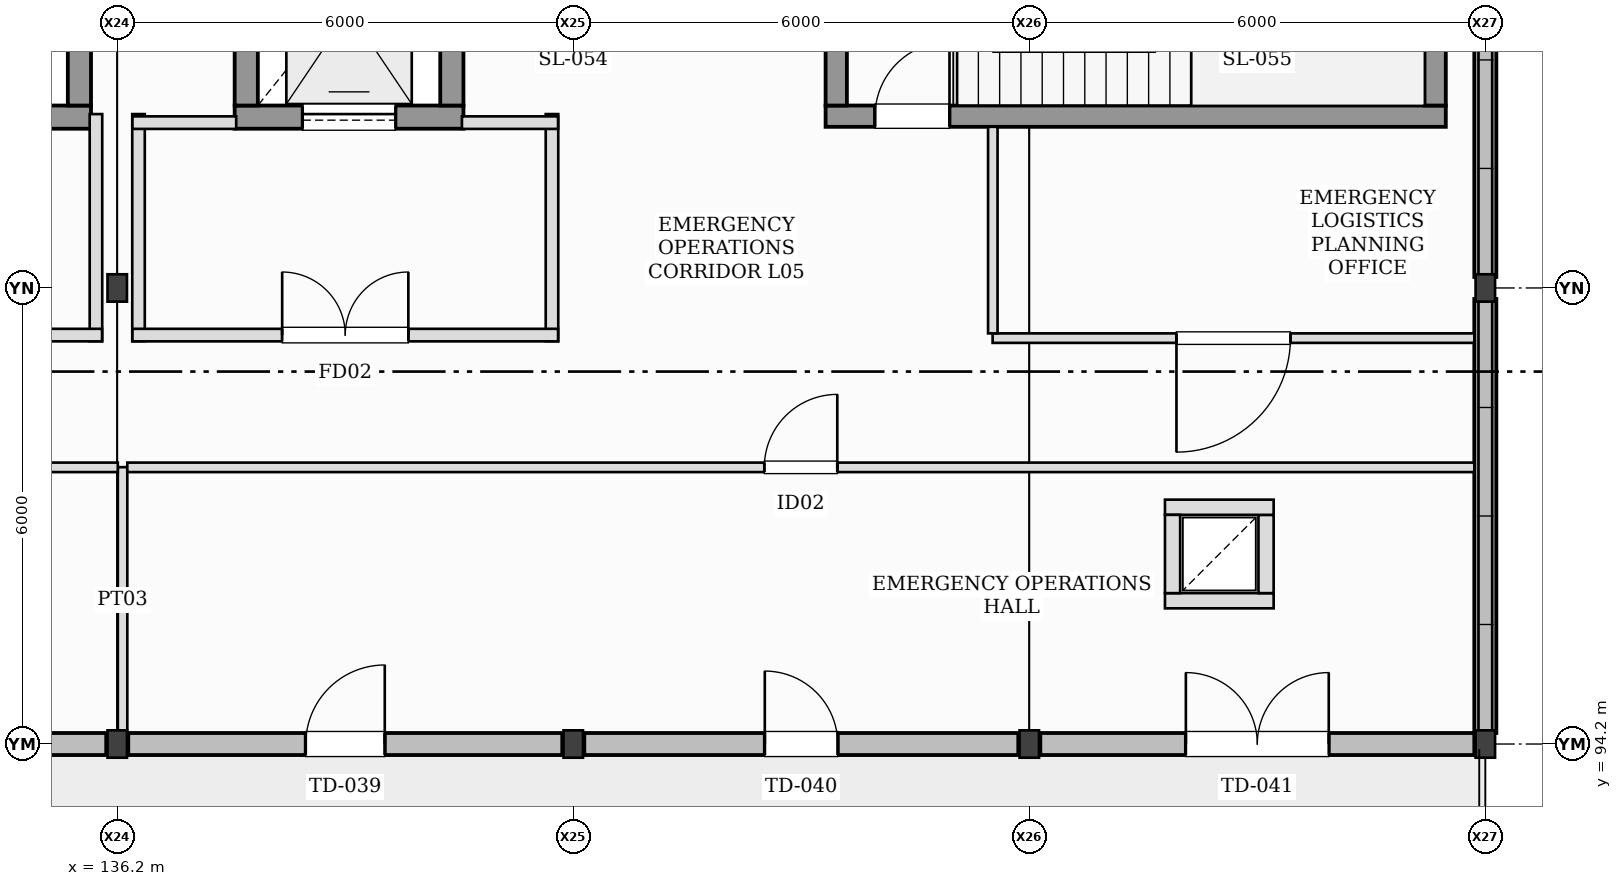
"""IFC4 building model, lengths in metres.
Left out: names, types, materials, properties, quantities, classifications, styles, units other than length and angle.
Written with IfcOpenShell. Run it as: python <this file> out.ifc"""

import sys

from ifc_helpers import new_model, si_unit, direction, frame, frame_2d, origin, origin_2d, place, context, subcontext, project, spatial, rectangle, i_section, extrude, element, fill, save


model = new_model("IFC4")
c1 = context("Model", 3, precision=1e-05, world=origin(), true_north=direction((0.0, 1.0)))
c2 = subcontext(c1, "Body", "Model", "MODEL_VIEW")
j1 = project(units=[si_unit("LENGTHUNIT", "METRE"), si_unit("PLANEANGLEUNIT", "RADIAN")], contexts=[c1])
p1 = place(None, origin())
s1 = spatial("IfcSite", under=j1, at=p1, CompositionType="ELEMENT")
p2 = place(p1, origin())
s2 = spatial("IfcBuilding", under=s1, at=p2, CompositionType="ELEMENT")
p3 = place(p2, frame((0.0, 0.0, 18.0)))
s3 = spatial("IfcBuildingStorey", under=s2, at=p3, CompositionType="ELEMENT", Elevation=18.0)
for number, where, z_axis, x_axis in (
    (1, (136.2, 94.2, 0.0), (0.0, 0.0, 1.0), (1.0, 0.0, 0.0)),
    (2, (136.2, 100.2, 0.0), (0.0, 0.0, 1.0), (1.0, 0.0, 0.0)),
    (3, (142.2, 94.2, 0.0), (0.0, 0.0, 1.0), (1.0, 0.0, 0.0)),
    (4, (148.2, 94.2, 0.0), (0.0, 0.0, 1.0), (1.0, 0.0, 0.0)),
    (5, (154.2, 94.2, 0.0), (0.0, 0.0, 1.0), (1.0, 0.0, 0.0)),
    (6, (154.2, 100.2, 0.0), (0.0, 0.0, 1.0), (1.0, 0.0, 0.0)),
):
    element("IfcColumn", number, at=place(p3, frame(where, z_axis=z_axis, x_axis=x_axis)), inside=s3, PredefinedType="COLUMN", context=c2, shape_type="SweptSolid", body=[
        extrude(i_section(OverallWidth=0.256, OverallDepth=0.36, WebThickness=0.011, FlangeThickness=0.02, at=origin_2d()), origin(), (0.0, 0.0, 1.0), 3.6),
    ])
p4 = place(p3, frame((130.345, 94.2, 0.0), z_axis=(0.0, 0.0, 1.0), x_axis=(1.0, 0.0, 0.0)))
e7 = element("IfcWall", 7, at=p4, inside=s3, PredefinedType="STANDARD", context=c2, shape_type="SweptSolid", body=[
    extrude(rectangle(XDim=5.71, YDim=0.29, at=frame_2d((2.855, 0.0))), origin(), (0.0, 0.0, 1.0), 3.6),
])
p5 = place(p4, frame((2.045, 0.0, 0.0)))
e8 = element("IfcOpeningElement", 8, at=p5, cuts=e7, PredefinedType="OPENING", context=c2, shape_type="SweptSolid", body=[
    extrude(rectangle(XDim=1.62, YDim=2.2, at=frame_2d((0.81, 1.1))), frame((0.0, 0.155, 0.0), z_axis=(0.0, -1.0, 0.0), x_axis=(1.0, 0.0, 0.0)), (0.0, 0.0, 1.0), 0.31),
])
p6 = place(p3, frame((136.345, 94.2, 0.0), z_axis=(0.0, 0.0, 1.0), x_axis=(1.0, 0.0, 0.0)))
e9 = element("IfcWall", 9, at=p6, inside=s3, PredefinedType="STANDARD", context=c2, shape_type="SweptSolid", body=[
    extrude(rectangle(XDim=5.71, YDim=0.29, at=frame_2d((2.855, 0.0))), origin(), (0.0, 0.0, 1.0), 3.6),
])
p7 = place(p6, frame((2.335, 0.0, 0.0)))
e10 = element("IfcOpeningElement", 10, at=p7, cuts=e9, PredefinedType="OPENING", context=c2, shape_type="SweptSolid", body=[
    extrude(rectangle(XDim=1.04, YDim=2.16, at=frame_2d((0.52, 1.08))), frame((0.0, 0.155, 0.0), z_axis=(0.0, -1.0, 0.0), x_axis=(1.0, 0.0, 0.0)), (0.0, 0.0, 1.0), 0.31),
])
p8 = place(p3, frame((142.345, 94.2, 0.0), z_axis=(0.0, 0.0, 1.0), x_axis=(1.0, 0.0, 0.0)))
e11 = element("IfcWall", 11, at=p8, inside=s3, PredefinedType="STANDARD", context=c2, shape_type="SweptSolid", body=[
    extrude(rectangle(XDim=5.71, YDim=0.29, at=frame_2d((2.855, 0.0))), origin(), (0.0, 0.0, 1.0), 3.219),
])
p9 = place(p8, frame((2.375, 0.0, 0.0)))
e12 = element("IfcOpeningElement", 12, at=p9, cuts=e11, PredefinedType="OPENING", context=c2, shape_type="SweptSolid", body=[
    extrude(rectangle(XDim=0.96, YDim=2.14, at=frame_2d((0.48, 1.07))), frame((0.0, 0.155, 0.0), z_axis=(0.0, -1.0, 0.0), x_axis=(1.0, 0.0, 0.0)), (0.0, 0.0, 1.0), 0.31),
])
p10 = place(p3, frame((148.345, 94.2, 0.0), z_axis=(0.0, 0.0, 1.0), x_axis=(1.0, 0.0, 0.0)))
e13 = element("IfcWall", 13, at=p10, inside=s3, PredefinedType="STANDARD", context=c2, shape_type="SweptSolid", body=[
    extrude(rectangle(XDim=5.71, YDim=0.29, at=frame_2d((2.855, 0.0))), origin(), (0.0, 0.0, 1.0), 3.219),
])
p11 = place(p10, frame((1.915, 0.0, 0.0)))
e14 = element("IfcOpeningElement", 14, at=p11, cuts=e13, PredefinedType="OPENING", context=c2, shape_type="SweptSolid", body=[
    extrude(rectangle(XDim=1.88, YDim=2.28, at=frame_2d((0.94, 1.14))), frame((0.0, 0.155, 0.0), z_axis=(0.0, -1.0, 0.0), x_axis=(1.0, 0.0, 0.0)), (0.0, 0.0, 1.0), 0.31),
])
p12 = place(p3, frame((154.2, 94.345, 0.0), z_axis=(0.0, 0.0, 1.0), x_axis=(0.0, 1.0, 0.0)))
e15 = element("IfcWall", 15, at=p12, inside=s3, PredefinedType="STANDARD", context=c2, shape_type="SweptSolid", body=[
    extrude(rectangle(XDim=5.71, YDim=0.29, at=frame_2d((2.855, 0.0))), origin(), (0.0, 0.0, 1.0), 0.44),
])
p13 = place(p3, frame((154.2, 100.345, 0.0), z_axis=(0.0, 0.0, 1.0), x_axis=(0.0, 1.0, 0.0)))
e16 = element("IfcWall", 16, at=p13, inside=s3, PredefinedType="STANDARD", context=c2, shape_type="SweptSolid", body=[
    extrude(rectangle(XDim=5.71, YDim=0.29, at=frame_2d((2.855, 0.0))), origin(), (0.0, 0.0, 1.0), 0.56),
])
p14 = place(p3, frame((145.52, 102.46, 0.0), z_axis=(0.0, 0.0, 1.0), x_axis=(1.0, 0.0, 0.0)))
e17 = element("IfcWall", 17, at=p14, inside=s3, PredefinedType="SHEAR", context=c2, shape_type="SweptSolid", body=[
    extrude(rectangle(XDim=8.16, YDim=0.28, at=frame_2d((4.08, 0.0))), origin(), (0.0, 0.0, 1.0), 3.45),
])
p15 = place(p14, frame((0.65, 0.0, 0.0)))
e18 = element("IfcOpeningElement", 18, at=p15, cuts=e17, PredefinedType="OPENING", context=c2, shape_type="SweptSolid", body=[
    extrude(rectangle(XDim=0.98, YDim=2.15, at=frame_2d((0.49, 1.075))), frame((0.0, 0.15, 0.0), z_axis=(0.0, -1.0, 0.0), x_axis=(1.0, 0.0, 0.0)), (0.0, 0.0, 1.0), 0.3),
])
for number, where, z_axis, x_axis in (
    (19, (145.66, 105.6, 0.0), (0.0, 0.0, 1.0), (0.0, -1.0, 0.0)),
    (20, (153.54, 102.6, 0.0), (0.0, 0.0, 1.0), (0.0, 1.0, 0.0)),
):
    element("IfcWall", number, at=place(p3, frame(where, z_axis=z_axis, x_axis=x_axis)), inside=s3, PredefinedType="SHEAR", context=c2, shape_type="SweptSolid", body=[
        extrude(rectangle(XDim=3.0, YDim=0.28, at=frame_2d((1.5, 0.0))), origin(), (0.0, 0.0, 1.0), 3.45),
    ])
p16 = place(p3, frame((132.845, 102.448, 0.0), z_axis=(0.0, 0.0, 1.0), x_axis=(1.0, 0.0, 0.0)))
e21 = element("IfcWall", 21, at=p16, inside=s3, PredefinedType="SHEAR", context=c2, shape_type="SweptSolid", body=[
    extrude(rectangle(XDim=3.01, YDim=0.305, at=frame_2d((1.505, 0.0))), origin(), (0.0, 0.0, 1.0), 3.45),
])
p17 = place(p16, frame((0.895, 0.0, 0.0)))
e22 = element("IfcOpeningElement", 22, at=p17, cuts=e21, PredefinedType="OPENING", context=c2, shape_type="SweptSolid", body=[
    extrude(rectangle(XDim=1.22, YDim=2.22, at=frame_2d((0.61, 1.11))), frame((0.0, 0.162, 0.0), z_axis=(0.0, -1.0, 0.0), x_axis=(1.0, 0.0, 0.0)), (0.0, 0.0, 1.0), 0.325),
])
p18 = place(p3, frame((135.702, 102.6, 0.0), z_axis=(0.0, 0.0, 1.0), x_axis=(0.0, 1.0, 0.0)))
e23 = element("IfcWall", 23, at=p18, inside=s3, PredefinedType="SHEAR", context=c2, shape_type="SweptSolid", body=[
    extrude(rectangle(XDim=3.0, YDim=0.305, at=frame_2d((1.5, 0.0))), origin(), (0.0, 0.0, 1.0), 3.45),
])
p19 = place(p3, frame((135.92, 102.488, 0.0), z_axis=(0.0, 0.0, 1.0), x_axis=(0.0, -1.0, 0.0)))
e24 = element("IfcWall", 24, at=p19, inside=s3, PredefinedType="PARTITIONING", context=c2, shape_type="SweptSolid", body=[
    extrude(rectangle(XDim=2.988, YDim=0.165, at=frame_2d((1.494, 0.0))), origin(), (0.0, 0.0, 1.0), 3.36),
])
p20 = place(p3, frame((130.4, 99.58, 0.0), z_axis=(0.0, 0.0, 1.0), x_axis=(1.0, 0.0, 0.0)))
e25 = element("IfcWall", 25, at=p20, inside=s3, PredefinedType="PARTITIONING", context=c2, shape_type="SweptSolid", body=[
    extrude(rectangle(XDim=5.6, YDim=0.165, at=frame_2d((2.8, 0.0))), origin(), (0.0, 0.0, 1.0), 3.36),
])
p21 = place(p20, frame((1.97, 0.0, 0.0)))
e26 = element("IfcOpeningElement", 26, at=p21, cuts=e25, PredefinedType="OPENING", context=c2, shape_type="SweptSolid", body=[
    extrude(rectangle(XDim=1.66, YDim=2.2, at=frame_2d((0.83, 1.1))), frame((0.0, 0.093, 0.0), z_axis=(0.0, -1.0, 0.0), x_axis=(1.0, 0.0, 0.0)), (0.0, 0.0, 1.0), 0.185),
])
p22 = place(p3, frame((137.745, 102.448, 0.0), z_axis=(0.0, 0.0, 1.0), x_axis=(1.0, 0.0, 0.0)))
e27 = element("IfcWall", 27, at=p22, inside=s3, PredefinedType="SHEAR", context=c2, shape_type="SweptSolid", body=[
    extrude(rectangle(XDim=3.01, YDim=0.305, at=frame_2d((1.505, 0.0))), origin(), (0.0, 0.0, 1.0), 3.45),
])
p23 = place(p22, frame((0.895, 0.0, 0.0)))
e28 = element("IfcOpeningElement", 28, at=p23, cuts=e27, PredefinedType="OPENING", context=c2, shape_type="SweptSolid", body=[
    extrude(rectangle(XDim=1.22, YDim=2.22, at=frame_2d((0.61, 1.11))), frame((0.0, 0.162, 0.0), z_axis=(0.0, -1.0, 0.0), x_axis=(1.0, 0.0, 0.0)), (0.0, 0.0, 1.0), 0.325),
])
for number, where, z_axis, x_axis in (
    (29, (137.897, 105.6, 0.0), (0.0, 0.0, 1.0), (0.0, -1.0, 0.0)),
    (30, (140.603, 102.6, 0.0), (0.0, 0.0, 1.0), (0.0, 1.0, 0.0)),
):
    element("IfcWall", number, at=place(p3, frame(where, z_axis=z_axis, x_axis=x_axis)), inside=s3, PredefinedType="SHEAR", context=c2, shape_type="SweptSolid", body=[
        extrude(rectangle(XDim=3.0, YDim=0.305, at=frame_2d((1.5, 0.0))), origin(), (0.0, 0.0, 1.0), 3.45),
    ])
p24 = place(p3, frame((136.48, 99.5, 0.0), z_axis=(0.0, 0.0, 1.0), x_axis=(0.0, 1.0, 0.0)))
e31 = element("IfcWall", 31, at=p24, inside=s3, PredefinedType="PARTITIONING", context=c2, shape_type="SweptSolid", body=[
    extrude(rectangle(XDim=2.988, YDim=0.165, at=frame_2d((1.494, 0.0))), origin(), (0.0, 0.0, 1.0), 3.36),
])
p25 = place(p3, frame((141.92, 102.488, 0.0), z_axis=(0.0, 0.0, 1.0), x_axis=(0.0, -1.0, 0.0)))
e32 = element("IfcWall", 32, at=p25, inside=s3, PredefinedType="PARTITIONING", context=c2, shape_type="SweptSolid", body=[
    extrude(rectangle(XDim=2.988, YDim=0.165, at=frame_2d((1.494, 0.0))), origin(), (0.0, 0.0, 1.0), 3.246),
])
p26 = place(p3, frame((136.4, 102.375, 0.0), z_axis=(0.0, 0.0, 1.0), x_axis=(1.0, 0.0, 0.0)))
e33 = element("IfcWall", 33, at=p26, inside=s3, PredefinedType="PARTITIONING", context=c2, shape_type="SweptSolid", body=[
    extrude(rectangle(XDim=1.365, YDim=0.165, at=frame_2d((0.683, 0.0))), origin(), (0.0, 0.0, 1.0), 3.36),
])
p27 = place(p3, frame((140.735, 102.375, 0.0), z_axis=(0.0, 0.0, 1.0), x_axis=(1.0, 0.0, 0.0)))
e34 = element("IfcWall", 34, at=p27, inside=s3, PredefinedType="PARTITIONING", context=c2, shape_type="SweptSolid", body=[
    extrude(rectangle(XDim=1.265, YDim=0.165, at=frame_2d((0.632, 0.0))), origin(), (0.0, 0.0, 1.0), 3.36),
])
p28 = place(p3, frame((136.4, 99.58, 0.0), z_axis=(0.0, 0.0, 1.0), x_axis=(1.0, 0.0, 0.0)))
e35 = element("IfcWall", 35, at=p28, inside=s3, PredefinedType="PARTITIONING", context=c2, shape_type="SweptSolid", body=[
    extrude(rectangle(XDim=5.6, YDim=0.165, at=frame_2d((2.8, 0.0))), origin(), (0.0, 0.0, 1.0), 3.36),
])
p29 = place(p28, frame((1.97, 0.0, 0.0)))
e36 = element("IfcOpeningElement", 36, at=p29, cuts=e35, PredefinedType="OPENING", context=c2, shape_type="SweptSolid", body=[
    extrude(rectangle(XDim=1.66, YDim=2.2, at=frame_2d((0.83, 1.1))), frame((0.0, 0.093, 0.0), z_axis=(0.0, -1.0, 0.0), x_axis=(1.0, 0.0, 0.0)), (0.0, 0.0, 1.0), 0.185),
])
p30 = place(p3, frame((149.985, 96.085, 0.0), z_axis=(0.0, 0.0, 1.0), x_axis=(1.0, 0.0, 0.0)))
e37 = element("IfcWall", 37, at=p30, inside=s3, PredefinedType="PARTITIONING", context=c2, shape_type="SweptSolid", body=[
    extrude(rectangle(XDim=1.43, YDim=0.2, at=frame_2d((0.715, 0.0))), origin(), (0.0, 0.0, 1.0), 3.36),
])
p31 = place(p3, frame((151.315, 96.185, 0.0), z_axis=(0.0, 0.0, 1.0), x_axis=(0.0, 1.0, 0.0)))
e38 = element("IfcWall", 38, at=p31, inside=s3, PredefinedType="PARTITIONING", context=c2, shape_type="SweptSolid", body=[
    extrude(rectangle(XDim=1.03, YDim=0.2, at=frame_2d((0.515, 0.0))), origin(), (0.0, 0.0, 1.0), 3.36),
])
p32 = place(p3, frame((151.415, 97.315, 0.0), z_axis=(0.0, 0.0, 1.0), x_axis=(-1.0, 0.0, 0.0)))
e39 = element("IfcWall", 39, at=p32, inside=s3, PredefinedType="PARTITIONING", context=c2, shape_type="SweptSolid", body=[
    extrude(rectangle(XDim=1.43, YDim=0.2, at=frame_2d((0.715, 0.0))), origin(), (0.0, 0.0, 1.0), 3.36),
])
p33 = place(p3, frame((150.085, 97.215, 0.0), z_axis=(0.0, 0.0, 1.0), x_axis=(0.0, -1.0, 0.0)))
e40 = element("IfcWall", 40, at=p33, inside=s3, PredefinedType="PARTITIONING", context=c2, shape_type="SweptSolid", body=[
    extrude(rectangle(XDim=1.03, YDim=0.2, at=frame_2d((0.515, 0.0))), origin(), (0.0, 0.0, 1.0), 3.36),
])
p34 = place(p3, frame((136.27, 94.345, 0.0), z_axis=(0.0, 0.0, 1.0), x_axis=(0.0, 1.0, 0.0)))
e41 = element("IfcWall", 41, at=p34, inside=s3, PredefinedType="PARTITIONING", context=c2, shape_type="SweptSolid", body=[
    extrude(rectangle(XDim=3.498, YDim=0.125, at=frame_2d((1.749, 0.0))), origin(), (0.0, 0.0, 1.0), 3.36),
])
p35 = place(p3, frame((136.333, 97.84, 0.0), z_axis=(0.0, 0.0, 1.0), x_axis=(1.0, 0.0, 0.0)))
e42 = element("IfcWall", 42, at=p35, inside=s3, PredefinedType="PARTITIONING", context=c2, shape_type="SweptSolid", body=[
    extrude(rectangle(XDim=17.722, YDim=0.125, at=frame_2d((8.861, 0.0))), origin(), (0.0, 0.0, 1.0), 3.36),
])
p36 = place(p35, frame((8.381, 0.0, 0.0)))
e43 = element("IfcOpeningElement", 43, at=p36, cuts=e42, PredefinedType="OPENING", context=c2, shape_type="SweptSolid", body=[
    extrude(rectangle(XDim=0.96, YDim=2.15, at=frame_2d((0.48, 1.075))), frame((0.0, 0.073, 0.0), z_axis=(0.0, -1.0, 0.0), x_axis=(1.0, 0.0, 0.0)), (0.0, 0.0, 1.0), 0.145),
])
p37 = place(p3, frame((130.143, 97.84, 0.0), z_axis=(0.0, 0.0, 1.0), x_axis=(1.0, 0.0, 0.0)))
e44 = element("IfcWall", 44, at=p37, inside=s3, PredefinedType="PARTITIONING", context=c2, shape_type="SweptSolid", body=[
    extrude(rectangle(XDim=6.065, YDim=0.125, at=frame_2d((3.032, 0.0))), origin(), (0.0, 0.0, 1.0), 3.36),
])
p38 = place(p37, frame((2.452, 0.0, 0.0)))
e45 = element("IfcOpeningElement", 45, at=p38, cuts=e44, PredefinedType="OPENING", context=c2, shape_type="SweptSolid", body=[
    extrude(rectangle(XDim=1.16, YDim=2.2, at=frame_2d((0.58, 1.1))), frame((0.0, 0.073, 0.0), z_axis=(0.0, -1.0, 0.0), x_axis=(1.0, 0.0, 0.0)), (0.0, 0.0, 1.0), 0.145),
])
p39 = place(p3, frame((154.055, 99.54, 0.0), z_axis=(0.0, 0.0, 1.0), x_axis=(-1.0, 0.0, 0.0)))
e46 = element("IfcWall", 46, at=p39, inside=s3, PredefinedType="PARTITIONING", context=c2, shape_type="SweptSolid", body=[
    extrude(rectangle(XDim=6.337, YDim=0.125, at=frame_2d((3.169, 0.0))), origin(), (0.0, 0.0, 1.0), 3.36),
])
p40 = place(p39, frame((2.419, 0.0, 0.0)))
e47 = element("IfcOpeningElement", 47, at=p40, cuts=e46, PredefinedType="OPENING", context=c2, shape_type="SweptSolid", body=[
    extrude(rectangle(XDim=1.5, YDim=2.22, at=frame_2d((0.75, 1.11))), frame((0.0, 0.073, 0.0), z_axis=(0.0, -1.0, 0.0), x_axis=(1.0, 0.0, 0.0)), (0.0, 0.0, 1.0), 0.145),
])
p41 = place(p3, frame((147.72, 99.603, 0.0), z_axis=(0.0, 0.0, 1.0), x_axis=(0.0, 1.0, 0.0)))
e48 = element("IfcWall", 48, at=p41, inside=s3, PredefinedType="PARTITIONING", context=c2, shape_type="SweptSolid", body=[
    extrude(rectangle(XDim=2.718, YDim=0.125, at=frame_2d((1.359, 0.0))), origin(), (0.0, 0.0, 1.0), 3.36),
])
p42 = place(p7, frame((1.04, 0.0, 0.0), z_axis=(0.0, 0.0, 1.0), x_axis=(-1.0, 0.0, 0.0)))
e49 = element("IfcDoor", 49, at=p42, inside=s3, OperationType="SINGLE_SWING_RIGHT", PredefinedType="DOOR", context=c2, shape_type="SweptSolid", body=[
    extrude(rectangle(XDim=1.04, YDim=2.16, at=frame_2d((0.52, 1.08))), frame((0.0, 0.025, 0.0), z_axis=(0.0, -1.0, 0.0), x_axis=(1.0, 0.0, 0.0)), (0.0, 0.0, 1.0), 0.05),
])
fill(e10, e49)
p43 = place(p9, frame((0.96, 0.0, 0.0), z_axis=(0.0, 0.0, 1.0), x_axis=(-1.0, 0.0, 0.0)))
e50 = element("IfcDoor", 50, at=p43, inside=s3, OperationType="SINGLE_SWING_LEFT", PredefinedType="DOOR", context=c2, shape_type="SweptSolid", body=[
    extrude(rectangle(XDim=0.96, YDim=2.14, at=frame_2d((0.48, 1.07))), frame((0.0, 0.025, 0.0), z_axis=(0.0, -1.0, 0.0), x_axis=(1.0, 0.0, 0.0)), (0.0, 0.0, 1.0), 0.05),
])
fill(e12, e50)
p44 = place(p11, frame((1.88, 0.0, 0.0), z_axis=(0.0, 0.0, 1.0), x_axis=(-1.0, 0.0, 0.0)))
e51 = element("IfcDoor", 51, at=p44, inside=s3, OperationType="DOUBLE_DOOR_SINGLE_SWING", PredefinedType="DOOR", context=c2, shape_type="SweptSolid", body=[
    extrude(rectangle(XDim=1.88, YDim=2.28, at=frame_2d((0.94, 1.14))), frame((0.0, 0.025, 0.0), z_axis=(0.0, -1.0, 0.0), x_axis=(1.0, 0.0, 0.0)), (0.0, 0.0, 1.0), 0.05),
])
fill(e14, e51)
p45 = place(p15, origin())
e52 = element("IfcDoor", 52, at=p45, inside=s3, OperationType="SINGLE_SWING_RIGHT", PredefinedType="DOOR", context=c2, shape_type="SweptSolid", body=[
    extrude(rectangle(XDim=0.98, YDim=2.15, at=frame_2d((0.49, 1.075))), frame((0.0, 0.025, 0.0), z_axis=(0.0, -1.0, 0.0), x_axis=(1.0, 0.0, 0.0)), (0.0, 0.0, 1.0), 0.05),
])
fill(e18, e52)
p46 = place(p23, origin())
e53 = element("IfcDoor", 53, at=p46, inside=s3, OperationType="SLIDING_TO_LEFT", PredefinedType="DOOR", context=c2, shape_type="SweptSolid", body=[
    extrude(rectangle(XDim=1.22, YDim=2.22, at=frame_2d((0.61, 1.11))), frame((0.0, 0.025, 0.0), z_axis=(0.0, -1.0, 0.0), x_axis=(1.0, 0.0, 0.0)), (0.0, 0.0, 1.0), 0.05),
])
fill(e28, e53)
p47 = place(p29, frame((1.66, 0.0, 0.0), z_axis=(0.0, 0.0, 1.0), x_axis=(-1.0, 0.0, 0.0)))
e54 = element("IfcDoor", 54, at=p47, inside=s3, OperationType="DOUBLE_DOOR_SINGLE_SWING", PredefinedType="DOOR", context=c2, shape_type="SweptSolid", body=[
    extrude(rectangle(XDim=1.66, YDim=2.2, at=frame_2d((0.83, 1.1))), frame((0.0, 0.025, 0.0), z_axis=(0.0, -1.0, 0.0), x_axis=(1.0, 0.0, 0.0)), (0.0, 0.0, 1.0), 0.05),
])
fill(e36, e54)
p48 = place(p36, origin())
e55 = element("IfcDoor", 55, at=p48, inside=s3, OperationType="SINGLE_SWING_RIGHT", PredefinedType="DOOR", context=c2, shape_type="SweptSolid", body=[
    extrude(rectangle(XDim=0.96, YDim=2.15, at=frame_2d((0.48, 1.075))), frame((0.0, 0.025, 0.0), z_axis=(0.0, -1.0, 0.0), x_axis=(1.0, 0.0, 0.0)), (0.0, 0.0, 1.0), 0.05),
])
fill(e43, e55)
p49 = place(p40, frame((1.5, 0.0, 0.0), z_axis=(0.0, 0.0, 1.0), x_axis=(-1.0, 0.0, 0.0)))
e56 = element("IfcDoor", 56, at=p49, inside=s3, OperationType="SINGLE_SWING_RIGHT", PredefinedType="DOOR", context=c2, shape_type="SweptSolid", body=[
    extrude(rectangle(XDim=1.5, YDim=2.22, at=frame_2d((0.75, 1.11))), frame((0.0, 0.025, 0.0), z_axis=(0.0, -1.0, 0.0), x_axis=(1.0, 0.0, 0.0)), (0.0, 0.0, 1.0), 0.05),
])
fill(e47, e56)
save(model, sys.argv[1])
